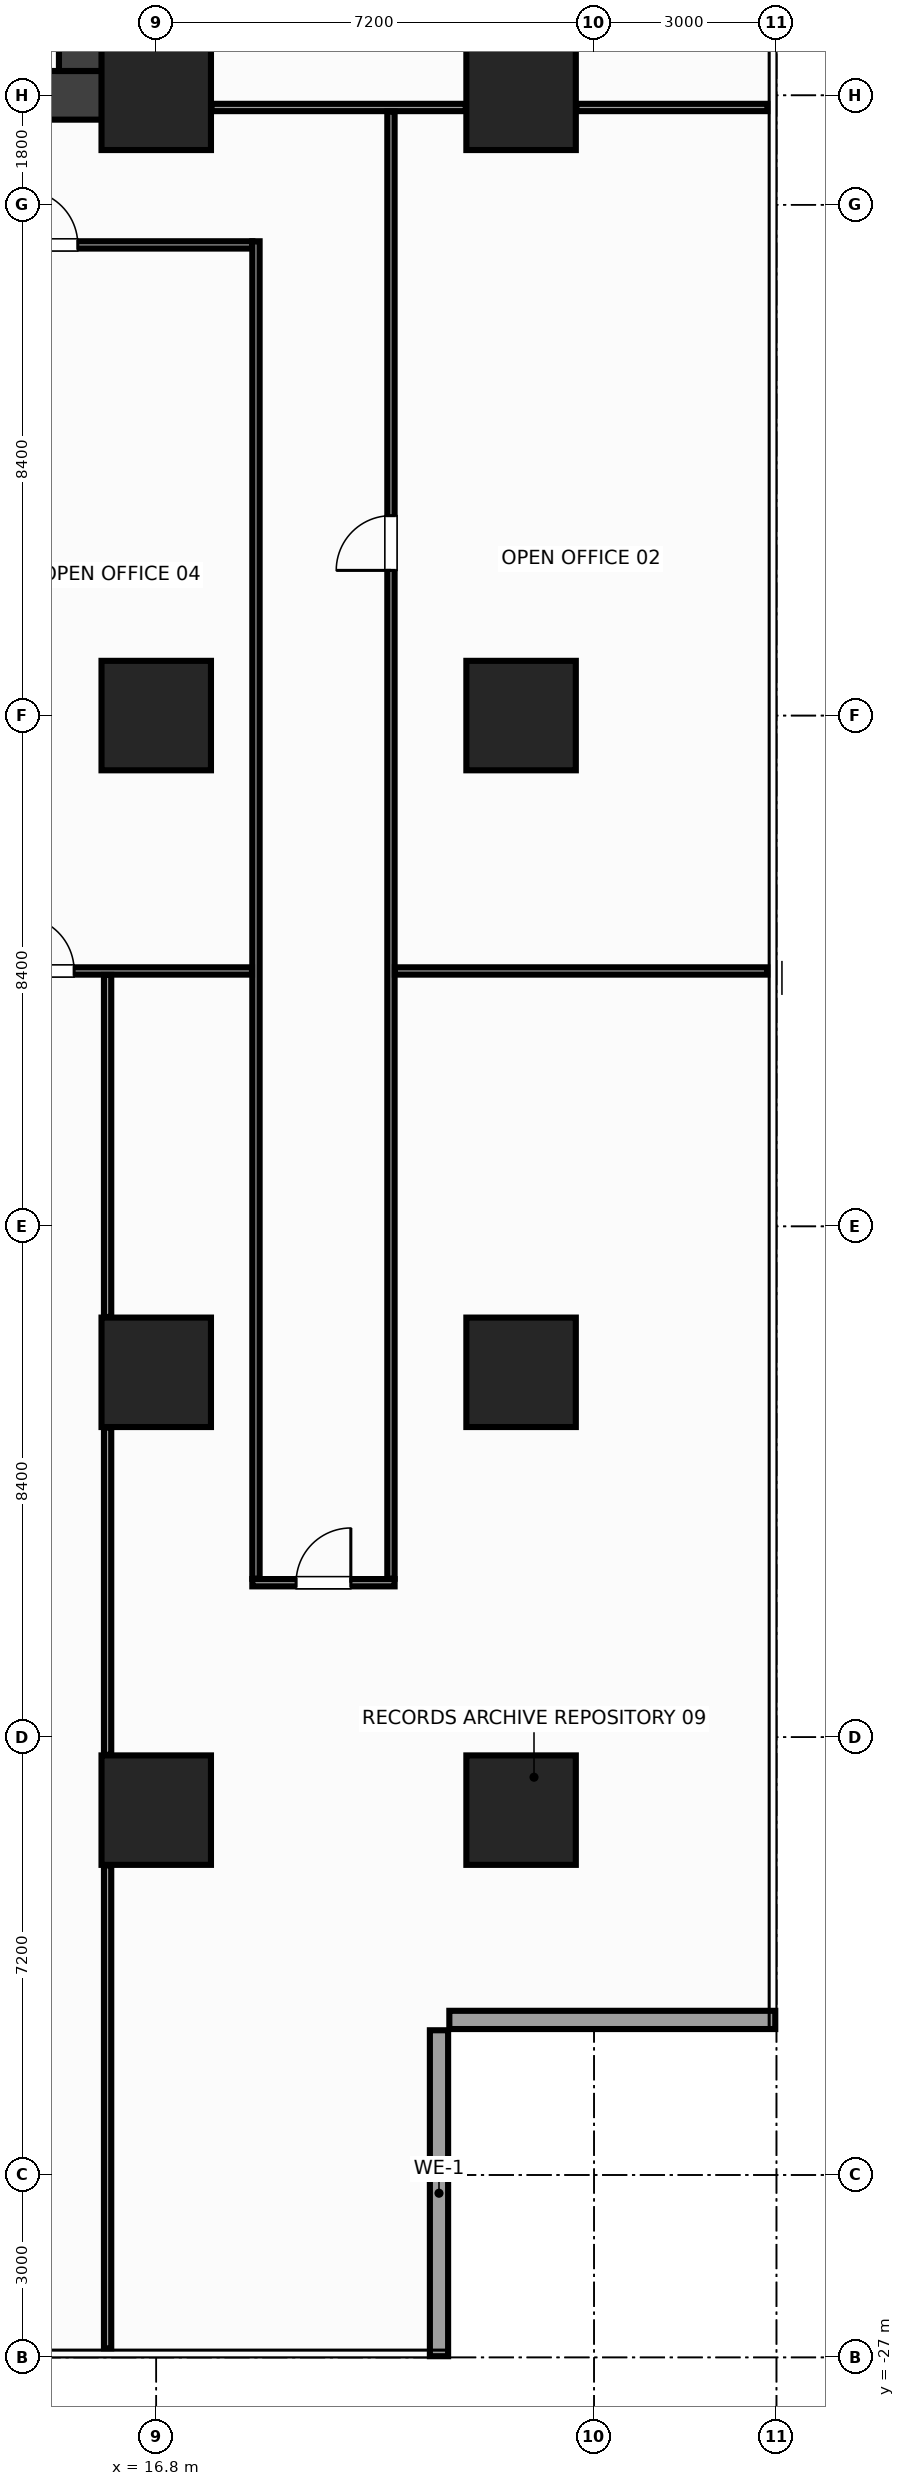
"""IFC4 building model, lengths in metres.
Left out: names, types, materials, properties, quantities, classifications, styles, units other than length and angle.
Written with IfcOpenShell. Run it as: python <this file> out.ifc"""

import sys

from ifc_helpers import new_model, si_unit, direction, frame, frame_2d, origin, origin_2d, place, context, subcontext, project, spatial, rectangle, extrude, source, transform, mapped, element, fill, save


model = new_model("IFC4")
c1 = context("Model", 3, precision=1e-05, world=origin(), true_north=direction((0.0, 1.0)))
c2 = subcontext(c1, "Body", "Model", "MODEL_VIEW")
j1 = project(units=[si_unit("LENGTHUNIT", "METRE"), si_unit("PLANEANGLEUNIT", "RADIAN")], contexts=[c1])
p1 = place(None, origin())
s1 = spatial("IfcSite", under=j1, at=p1, CompositionType="ELEMENT")
p2 = place(p1, origin())
s2 = spatial("IfcBuilding", under=s1, at=p2, CompositionType="ELEMENT")
p3 = place(p2, frame((0.0, 0.0, 27.2)))
s3 = spatial("IfcBuildingStorey", under=s2, at=p3, CompositionType="ELEMENT", Elevation=27.2)
m1 = source(origin(), c2, "Body", "SweptSolid", [
    extrude(rectangle(XDim=32.0, YDim=0.8, at=frame_2d((16.0, 0.0))), origin(), (0.0, 0.0, 1.0), 3.6),
])
p4 = place(p3, frame((-16.0, 10.2, 0.0), z_axis=(0.0, 0.0, 1.0), x_axis=(1.0, 0.0, 0.0)))
e1 = element("IfcWall", 1, at=p4, inside=s3, PredefinedType="SHEAR", context=c2, shape_type="MappedRepresentation", body=[
    mapped(m1, transform((0.0, 0.0, 0.0), x_axis=(1.0, 0.0, 0.0), y_axis=(0.0, 1.0, 0.0), z_axis=(0.0, 0.0, 1.0), scale=1.0)),
])
p5 = place(p4, frame((1.85, 0.0, 0.0)))
e2 = element("IfcOpeningElement", 2, at=p5, cuts=e1, PredefinedType="OPENING", context=c2, shape_type="SweptSolid", body=[
    extrude(rectangle(XDim=1.6, YDim=2.15, at=frame_2d((0.8, 1.075))), frame((0.0, 0.412, 0.0), z_axis=(0.0, -1.0, 0.0), x_axis=(1.0, 0.0, 0.0)), (0.0, 0.0, 1.0), 0.824),
])
p6 = place(p4, frame((28.55, 0.0, 0.0)))
e3 = element("IfcOpeningElement", 3, at=p6, cuts=e1, PredefinedType="OPENING", context=c2, shape_type="SweptSolid", body=[
    extrude(rectangle(XDim=1.6, YDim=2.15, at=frame_2d((0.8, 1.075))), frame((0.0, 0.412, 0.0), z_axis=(0.0, -1.0, 0.0), x_axis=(1.0, 0.0, 0.0)), (0.0, 0.0, 1.0), 0.824),
])
p7 = place(p4, frame((15.25, 0.0, 0.0)))
e4 = element("IfcOpeningElement", 4, at=p7, cuts=e1, PredefinedType="OPENING", context=c2, shape_type="SweptSolid", body=[
    extrude(rectangle(XDim=1.5, YDim=2.2, at=frame_2d((0.75, 1.1))), frame((0.0, 0.412, 0.0), z_axis=(0.0, -1.0, 0.0), x_axis=(1.0, 0.0, 0.0)), (0.0, 0.0, 1.0), 0.824),
])
m2 = source(origin(), c2, "Body", "SweptSolid", [
    extrude(rectangle(XDim=12.8, YDim=0.8, at=frame_2d((6.4, 0.0))), origin(), (0.0, 0.0, 1.0), 3.6),
])
p8 = place(p3, frame((15.6, 10.6, 0.0), z_axis=(0.0, 0.0, 1.0), x_axis=(0.0, 1.0, 0.0)))
e5 = element("IfcWall", 5, at=p8, inside=s3, PredefinedType="SHEAR", context=c2, shape_type="MappedRepresentation", body=[
    mapped(m2, transform((0.0, 0.0, 0.0), x_axis=(1.0, 0.0, 0.0), y_axis=(0.0, 1.0, 0.0), z_axis=(0.0, 0.0, 1.0), scale=1.0)),
])
m3 = source(origin(), c2, "Body", "SweptSolid", [
    extrude(rectangle(XDim=1.8, YDim=1.8, at=origin_2d()), origin(), (0.0, 0.0, 1.0), 3.6),
])
for number, where, z_axis, x_axis in (
    (6, (16.8, -18.0, 0.0), (0.0, 0.0, 1.0), (1.0, 0.0, 0.0)),
    (7, (16.8, -10.8, 0.0), (0.0, 0.0, 1.0), (1.0, 0.0, 0.0)),
    (8, (16.8, 0.0, 0.0), (0.0, 0.0, 1.0), (1.0, 0.0, 0.0)),
    (9, (16.8, 10.2, 0.0), (0.0, 0.0, 1.0), (1.0, 0.0, 0.0)),
    (10, (22.8, -18.0, 0.0), (0.0, 0.0, 1.0), (1.0, 0.0, 0.0)),
    (11, (22.8, -10.8, 0.0), (0.0, 0.0, 1.0), (1.0, 0.0, 0.0)),
    (12, (22.8, 0.0, 0.0), (0.0, 0.0, 1.0), (1.0, 0.0, 0.0)),
    (13, (22.8, 10.2, 0.0), (0.0, 0.0, 1.0), (1.0, 0.0, 0.0)),
):
    element("IfcColumn", number, at=place(p3, frame(where, z_axis=z_axis, x_axis=x_axis)), inside=s3, PredefinedType="COLUMN", context=c2, shape_type="MappedRepresentation", body=[
        mapped(m3, transform((0.0, 0.0, 0.0), x_axis=(1.0, 0.0, 0.0), y_axis=(0.0, 1.0, 0.0), z_axis=(0.0, 0.0, 1.0), scale=1.0)),
    ])
m4 = source(origin(), c2, "Body", "SweptSolid", [
    extrude(rectangle(XDim=5.36, YDim=0.3, at=frame_2d((2.68, 0.0))), origin(), (0.0, 0.0, 1.0), 2.74),
])
for number, where, z_axis, x_axis in (
    (14, (21.45, -26.98, 0.0), (0.0, 0.0, 1.0), (0.0, 1.0, 0.0)),
    (15, (21.62, -21.45, 0.0), (0.0, 0.0, 1.0), (1.0, 0.0, 0.0)),
):
    element("IfcWall", number, at=place(p3, frame(where, z_axis=z_axis, x_axis=x_axis)), inside=s3, PredefinedType="STANDARD", context=c2, shape_type="MappedRepresentation", body=[
        mapped(m4, transform((0.0, 0.0, 0.0), x_axis=(1.0, 0.0, 0.0), y_axis=(0.0, 1.0, 0.0), z_axis=(0.0, 0.0, 1.0), scale=1.0)),
    ])
m5 = source(origin(), c2, "Body", "SweptSolid", [
    extrude(rectangle(XDim=4.18, YDim=0.12, at=frame_2d((2.09, 0.0))), origin(), (0.0, 0.0, 1.0), 2.745),
])
p9 = place(p3, frame((17.71, 10.0, 0.0), z_axis=(0.0, 0.0, 1.0), x_axis=(1.0, 0.0, 0.0)))
e16 = element("IfcWall", 16, at=p9, inside=s3, PredefinedType="PARTITIONING", context=c2, shape_type="MappedRepresentation", body=[
    mapped(m5, transform((0.0, 0.0, 0.0), x_axis=(1.0, 0.0, 0.0), y_axis=(0.0, 1.0, 0.0), z_axis=(0.0, 0.0, 1.0), scale=1.0)),
])
m6 = source(origin(), c2, "Body", "SweptSolid", [
    extrude(rectangle(XDim=3.14, YDim=0.12, at=frame_2d((1.57, 0.0))), origin(), (0.0, 0.0, 1.0), 2.435),
])
p10 = place(p3, frame((23.71, 10.0, 0.0), z_axis=(0.0, 0.0, 1.0), x_axis=(1.0, 0.0, 0.0)))
e17 = element("IfcWall", 17, at=p10, inside=s3, PredefinedType="PARTITIONING", context=c2, shape_type="MappedRepresentation", body=[
    mapped(m6, transform((0.0, 0.0, 0.0), x_axis=(1.0, 0.0, 0.0), y_axis=(0.0, 1.0, 0.0), z_axis=(0.0, 0.0, 1.0), scale=1.0)),
])
m7 = source(origin(), c2, "Body", "SweptSolid", [
    extrude(rectangle(XDim=36.76, YDim=0.12, at=frame_2d((18.38, 0.0))), origin(), (0.0, 0.0, 1.0), 2.745),
])
p11 = place(p3, frame((-18.38, 7.74, 0.0), z_axis=(0.0, 0.0, 1.0), x_axis=(1.0, 0.0, 0.0)))
e18 = element("IfcWall", 18, at=p11, inside=s3, PredefinedType="PARTITIONING", context=c2, shape_type="MappedRepresentation", body=[
    mapped(m7, transform((0.0, 0.0, 0.0), x_axis=(1.0, 0.0, 0.0), y_axis=(0.0, 1.0, 0.0), z_axis=(0.0, 0.0, 1.0), scale=1.0)),
])
p12 = place(p11, frame((2.79, 0.0, 0.0)))
e19 = element("IfcOpeningElement", 19, at=p12, cuts=e18, PredefinedType="OPENING", context=c2, shape_type="SweptSolid", body=[
    extrude(rectangle(XDim=0.9, YDim=2.15, at=frame_2d((0.45, 1.075))), frame((0.0, 0.072, 0.0), z_axis=(0.0, -1.0, 0.0), x_axis=(1.0, 0.0, 0.0)), (0.0, 0.0, 1.0), 0.144),
])
p13 = place(p11, frame((32.99, 0.0, 0.0)))
e20 = element("IfcOpeningElement", 20, at=p13, cuts=e18, PredefinedType="OPENING", context=c2, shape_type="SweptSolid", body=[
    extrude(rectangle(XDim=0.9, YDim=2.15, at=frame_2d((0.45, 1.075))), frame((0.0, 0.072, 0.0), z_axis=(0.0, -1.0, 0.0), x_axis=(1.0, 0.0, 0.0)), (0.0, 0.0, 1.0), 0.144),
])
p14 = place(p11, frame((9.93, 0.0, 0.0)))
e21 = element("IfcOpeningElement", 21, at=p14, cuts=e18, PredefinedType="OPENING", context=c2, shape_type="SweptSolid", body=[
    extrude(rectangle(XDim=0.9, YDim=2.15, at=frame_2d((0.45, 1.075))), frame((0.0, 0.072, 0.0), z_axis=(0.0, -1.0, 0.0), x_axis=(1.0, 0.0, 0.0)), (0.0, 0.0, 1.0), 0.144),
])
p15 = place(p11, frame((18.23, 0.0, 0.0)))
e22 = element("IfcOpeningElement", 22, at=p15, cuts=e18, PredefinedType="OPENING", context=c2, shape_type="SweptSolid", body=[
    extrude(rectangle(XDim=0.9, YDim=2.15, at=frame_2d((0.45, 1.075))), frame((0.0, 0.072, 0.0), z_axis=(0.0, -1.0, 0.0), x_axis=(1.0, 0.0, 0.0)), (0.0, 0.0, 1.0), 0.144),
])
p16 = place(p11, frame((27.03, 0.0, 0.0)))
e23 = element("IfcOpeningElement", 23, at=p16, cuts=e18, PredefinedType="OPENING", context=c2, shape_type="SweptSolid", body=[
    extrude(rectangle(XDim=0.9, YDim=2.15, at=frame_2d((0.45, 1.075))), frame((0.0, 0.072, 0.0), z_axis=(0.0, -1.0, 0.0), x_axis=(1.0, 0.0, 0.0)), (0.0, 0.0, 1.0), 0.144),
])
m8 = source(origin(), c2, "Body", "SweptSolid", [
    extrude(rectangle(XDim=2.34, YDim=0.12, at=frame_2d((1.17, 0.0))), origin(), (0.0, 0.0, 1.0), 2.945),
])
p17 = place(p3, frame((18.38, -14.26, 0.0), z_axis=(0.0, 0.0, 1.0), x_axis=(1.0, 0.0, 0.0)))
e24 = element("IfcWall", 24, at=p17, inside=s3, PredefinedType="PARTITIONING", context=c2, shape_type="MappedRepresentation", body=[
    mapped(m8, transform((0.0, 0.0, 0.0), x_axis=(1.0, 0.0, 0.0), y_axis=(0.0, 1.0, 0.0), z_axis=(0.0, 0.0, 1.0), scale=1.0)),
])
p18 = place(p17, frame((0.72, 0.0, 0.0)))
e25 = element("IfcOpeningElement", 25, at=p18, cuts=e24, PredefinedType="OPENING", context=c2, shape_type="SweptSolid", body=[
    extrude(rectangle(XDim=0.9, YDim=2.15, at=frame_2d((0.45, 1.075))), frame((0.0, 0.072, 0.0), z_axis=(0.0, -1.0, 0.0), x_axis=(1.0, 0.0, 0.0)), (0.0, 0.0, 1.0), 0.144),
])
m9 = source(origin(), c2, "Body", "SweptSolid", [
    extrude(rectangle(XDim=21.995, YDim=0.12, at=frame_2d((10.998, 0.0))), origin(), (0.0, 0.0, 1.0), 2.745),
])
p19 = place(p3, frame((18.44, -14.195, 0.0), z_axis=(0.0, 0.0, 1.0), x_axis=(0.0, 1.0, 0.0)))
e26 = element("IfcWall", 26, at=p19, inside=s3, PredefinedType="PARTITIONING", context=c2, shape_type="MappedRepresentation", body=[
    mapped(m9, transform((0.0, 0.0, 0.0), x_axis=(1.0, 0.0, 0.0), y_axis=(0.0, 1.0, 0.0), z_axis=(0.0, 0.0, 1.0), scale=1.0)),
])
m10 = source(origin(), c2, "Body", "SweptSolid", [
    extrude(rectangle(XDim=24.13, YDim=0.12, at=frame_2d((12.065, 0.0))), origin(), (0.0, 0.0, 1.0), 2.745),
])
p20 = place(p3, frame((20.66, -14.195, 0.0), z_axis=(0.0, 0.0, 1.0), x_axis=(0.0, 1.0, 0.0)))
e27 = element("IfcWall", 27, at=p20, inside=s3, PredefinedType="PARTITIONING", context=c2, shape_type="MappedRepresentation", body=[
    mapped(m10, transform((0.0, 0.0, 0.0), x_axis=(1.0, 0.0, 0.0), y_axis=(0.0, 1.0, 0.0), z_axis=(0.0, 0.0, 1.0), scale=1.0)),
])
p21 = place(p20, frame((16.583, 0.0, 0.0)))
e28 = element("IfcOpeningElement", 28, at=p21, cuts=e27, PredefinedType="OPENING", context=c2, shape_type="SweptSolid", body=[
    extrude(rectangle(XDim=0.9, YDim=2.15, at=frame_2d((0.45, 1.075))), frame((0.0, 0.072, 0.0), z_axis=(0.0, -1.0, 0.0), x_axis=(1.0, 0.0, 0.0)), (0.0, 0.0, 1.0), 0.144),
])
m11 = source(origin(), c2, "Body", "SweptSolid", [
    extrude(rectangle(XDim=36.75, YDim=0.12, at=frame_2d((18.375, 0.0))), origin(), (0.0, 0.0, 1.0), 2.745),
])
p22 = place(p3, frame((-18.375, -4.2, 0.0), z_axis=(0.0, 0.0, 1.0), x_axis=(1.0, 0.0, 0.0)))
e29 = element("IfcWall", 29, at=p22, inside=s3, PredefinedType="PARTITIONING", context=c2, shape_type="MappedRepresentation", body=[
    mapped(m11, transform((0.0, 0.0, 0.0), x_axis=(1.0, 0.0, 0.0), y_axis=(0.0, 1.0, 0.0), z_axis=(0.0, 0.0, 1.0), scale=1.0)),
])
p23 = place(p22, frame((3.725, 0.0, 0.0)))
e30 = element("IfcOpeningElement", 30, at=p23, cuts=e29, PredefinedType="OPENING", context=c2, shape_type="SweptSolid", body=[
    extrude(rectangle(XDim=0.9, YDim=2.15, at=frame_2d((0.45, 1.075))), frame((0.0, 0.072, 0.0), z_axis=(0.0, -1.0, 0.0), x_axis=(1.0, 0.0, 0.0)), (0.0, 0.0, 1.0), 0.144),
])
p24 = place(p22, frame((18.225, 0.0, 0.0)))
e31 = element("IfcOpeningElement", 31, at=p24, cuts=e29, PredefinedType="OPENING", context=c2, shape_type="SweptSolid", body=[
    extrude(rectangle(XDim=0.9, YDim=2.15, at=frame_2d((0.45, 1.075))), frame((0.0, 0.072, 0.0), z_axis=(0.0, -1.0, 0.0), x_axis=(1.0, 0.0, 0.0)), (0.0, 0.0, 1.0), 0.144),
])
p25 = place(p22, frame((32.925, 0.0, 0.0)))
e32 = element("IfcOpeningElement", 32, at=p25, cuts=e29, PredefinedType="OPENING", context=c2, shape_type="SweptSolid", body=[
    extrude(rectangle(XDim=0.9, YDim=2.15, at=frame_2d((0.45, 1.075))), frame((0.0, 0.072, 0.0), z_axis=(0.0, -1.0, 0.0), x_axis=(1.0, 0.0, 0.0)), (0.0, 0.0, 1.0), 0.144),
])
m12 = source(origin(), c2, "Body", "SweptSolid", [
    extrude(rectangle(XDim=6.125, YDim=0.12, at=frame_2d((3.062, 0.0))), origin(), (0.0, 0.0, 1.0), 2.745),
])
p26 = place(p3, frame((20.725, -4.2, 0.0), z_axis=(0.0, 0.0, 1.0), x_axis=(1.0, 0.0, 0.0)))
e33 = element("IfcWall", 33, at=p26, inside=s3, PredefinedType="PARTITIONING", context=c2, shape_type="MappedRepresentation", body=[
    mapped(m12, transform((0.0, 0.0, 0.0), x_axis=(1.0, 0.0, 0.0), y_axis=(0.0, 1.0, 0.0), z_axis=(0.0, 0.0, 1.0), scale=1.0)),
])
m13 = source(origin(), c2, "Body", "SweptSolid", [
    extrude(rectangle(XDim=7.94, YDim=0.12, at=frame_2d((3.97, 0.0))), origin(), (0.0, 0.0, 1.0), 3.36),
])
p27 = place(p3, frame((16.0, -26.85, 0.0), z_axis=(0.0, 0.0, 1.0), x_axis=(0.0, 1.0, 0.0)))
e34 = element("IfcWall", 34, at=p27, inside=s3, PredefinedType="PARTITIONING", context=c2, shape_type="MappedRepresentation", body=[
    mapped(m13, transform((0.0, 0.0, 0.0), x_axis=(1.0, 0.0, 0.0), y_axis=(0.0, 1.0, 0.0), z_axis=(0.0, 0.0, 1.0), scale=1.0)),
])
m14 = source(origin(), c2, "Body", "SweptSolid", [
    extrude(rectangle(XDim=5.38, YDim=0.12, at=frame_2d((2.69, 0.0))), origin(), (0.0, 0.0, 1.0), 3.36),
])
p28 = place(p3, frame((16.0, -17.09, 0.0), z_axis=(0.0, 0.0, 1.0), x_axis=(0.0, 1.0, 0.0)))
e35 = element("IfcWall", 35, at=p28, inside=s3, PredefinedType="PARTITIONING", context=c2, shape_type="MappedRepresentation", body=[
    mapped(m14, transform((0.0, 0.0, 0.0), x_axis=(1.0, 0.0, 0.0), y_axis=(0.0, 1.0, 0.0), z_axis=(0.0, 0.0, 1.0), scale=1.0)),
])
m15 = source(origin(), c2, "Body", "SweptSolid", [
    extrude(rectangle(XDim=5.625, YDim=0.12, at=frame_2d((2.812, 0.0))), origin(), (0.0, 0.0, 1.0), 3.36),
])
p29 = place(p3, frame((16.0, -9.89, 0.0), z_axis=(0.0, 0.0, 1.0), x_axis=(0.0, 1.0, 0.0)))
e36 = element("IfcWall", 36, at=p29, inside=s3, PredefinedType="PARTITIONING", context=c2, shape_type="MappedRepresentation", body=[
    mapped(m15, transform((0.0, 0.0, 0.0), x_axis=(1.0, 0.0, 0.0), y_axis=(0.0, 1.0, 0.0), z_axis=(0.0, 0.0, 1.0), scale=1.0)),
])
m16 = source(origin(), c2, "Body", "SweptSolid", [
    extrude(rectangle(XDim=0.9, YDim=2.15, at=frame_2d((0.45, 1.075))), frame((0.0, 0.025, 0.0), z_axis=(0.0, -1.0, 0.0), x_axis=(1.0, 0.0, 0.0)), (0.0, 0.0, 1.0), 0.05),
])
p30 = place(p21, origin())
e37 = element("IfcDoor", 37, at=p30, inside=s3, OperationType="SINGLE_SWING_LEFT", PredefinedType="DOOR", context=c2, shape_type="MappedRepresentation", body=[
    mapped(m16, transform((0.0, 0.0, 0.0), x_axis=(1.0, 0.0, 0.0), y_axis=(0.0, 1.0, 0.0), z_axis=(0.0, 0.0, 1.0), scale=1.0)),
])
fill(e28, e37)
p31 = place(p13, origin())
e38 = element("IfcDoor", 38, at=p31, inside=s3, OperationType="SINGLE_SWING_LEFT", PredefinedType="DOOR", context=c2, shape_type="MappedRepresentation", body=[
    mapped(m16, transform((0.0, 0.0, 0.0), x_axis=(1.0, 0.0, 0.0), y_axis=(0.0, 1.0, 0.0), z_axis=(0.0, 0.0, 1.0), scale=1.0)),
])
fill(e20, e38)
p32 = place(p18, origin())
e39 = element("IfcDoor", 39, at=p32, inside=s3, OperationType="SINGLE_SWING_RIGHT", PredefinedType="DOOR", context=c2, shape_type="MappedRepresentation", body=[
    mapped(m16, transform((0.0, 0.0, 0.0), x_axis=(1.0, 0.0, 0.0), y_axis=(0.0, 1.0, 0.0), z_axis=(0.0, 0.0, 1.0), scale=1.0)),
])
fill(e25, e39)
p33 = place(p25, origin())
e40 = element("IfcDoor", 40, at=p33, inside=s3, OperationType="SINGLE_SWING_LEFT", PredefinedType="DOOR", context=c2, shape_type="MappedRepresentation", body=[
    mapped(m16, transform((0.0, 0.0, 0.0), x_axis=(1.0, 0.0, 0.0), y_axis=(0.0, 1.0, 0.0), z_axis=(0.0, 0.0, 1.0), scale=1.0)),
])
fill(e32, e40)
save(model, sys.argv[1])
